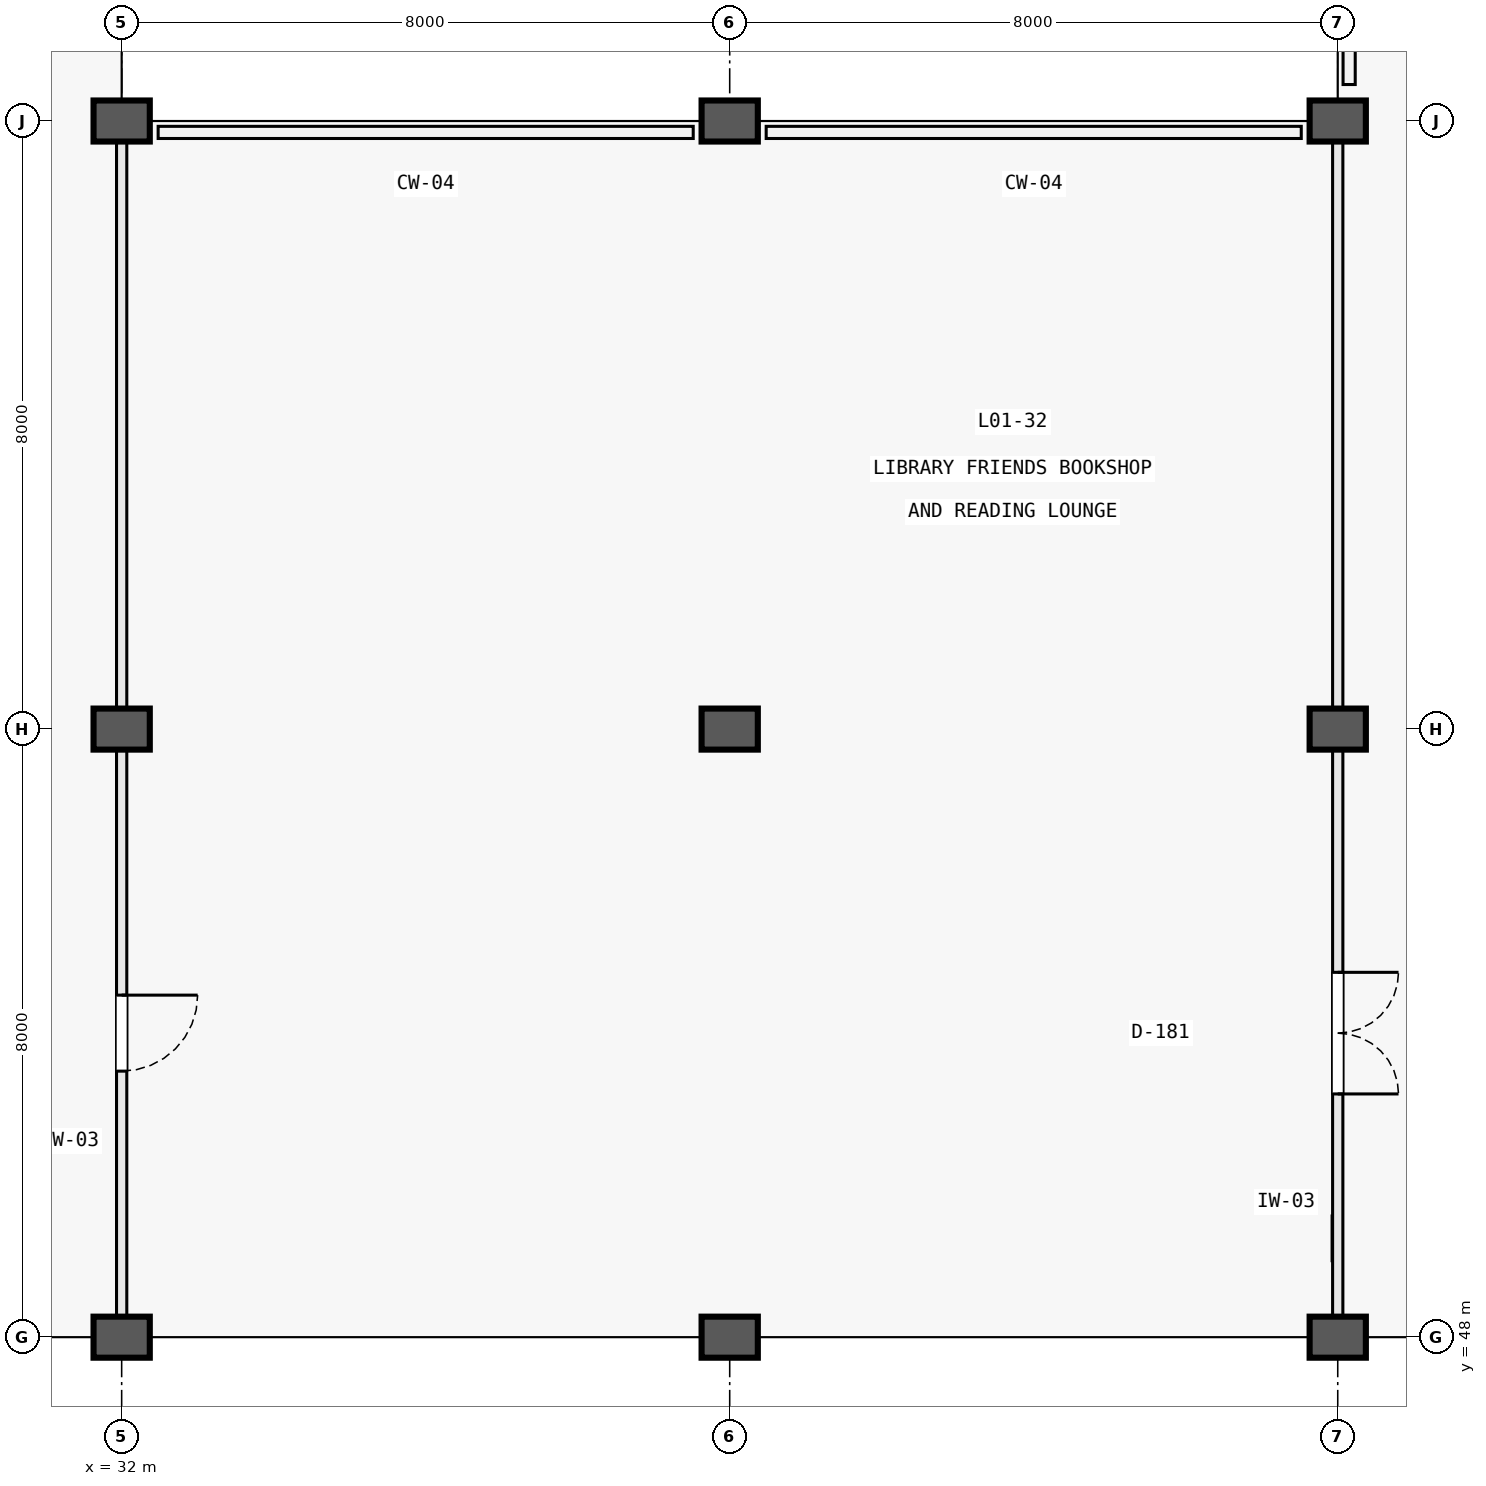
"""IFC4 building model, lengths in metres.
Left out: names, types, materials, properties, quantities, classifications, styles, units other than length and angle.
Written with IfcOpenShell. Run it as: python <this file> out.ifc"""

import sys

from ifc_helpers import new_model, si_unit, direction, frame, frame_2d, origin, origin_2d, place, context, subcontext, project, spatial, rectangle, extrude, element, fill, save


model = new_model("IFC4")
c1 = context("Model", 3, precision=1e-05, world=origin(), true_north=direction((0.0, 1.0)))
c2 = subcontext(c1, "Body", "Model", "MODEL_VIEW")
j1 = project(units=[si_unit("LENGTHUNIT", "METRE"), si_unit("PLANEANGLEUNIT", "RADIAN")], contexts=[c1])
p1 = place(None, origin())
s1 = spatial("IfcSite", under=j1, at=p1, CompositionType="ELEMENT")
p2 = place(p1, origin())
s2 = spatial("IfcBuilding", under=s1, at=p2, CompositionType="ELEMENT")
p3 = place(p2, origin())
s3 = spatial("IfcBuildingStorey", under=s2, at=p3, CompositionType="ELEMENT", Elevation=0.0)
for number, where, z_axis, x_axis in (
    (1, (32.0, 48.0, 0.0), (0.0, 0.0, 1.0), (1.0, 0.0, 0.0)),
    (2, (32.0, 56.0, 0.0), (0.0, 0.0, 1.0), (1.0, 0.0, 0.0)),
    (3, (32.0, 64.0, 0.0), (0.0, 0.0, 1.0), (1.0, 0.0, 0.0)),
    (4, (40.0, 48.0, 0.0), (0.0, 0.0, 1.0), (1.0, 0.0, 0.0)),
    (5, (40.0, 56.0, 0.0), (0.0, 0.0, 1.0), (1.0, 0.0, 0.0)),
    (6, (40.0, 64.0, 0.0), (0.0, 0.0, 1.0), (1.0, 0.0, 0.0)),
    (7, (48.0, 48.0, 0.0), (0.0, 0.0, 1.0), (1.0, 0.0, 0.0)),
    (8, (48.0, 56.0, 0.0), (0.0, 0.0, 1.0), (1.0, 0.0, 0.0)),
    (9, (48.0, 64.0, 0.0), (0.0, 0.0, 1.0), (1.0, 0.0, 0.0)),
):
    element("IfcColumn", number, at=place(p3, frame(where, z_axis=z_axis, x_axis=x_axis)), inside=s3, PredefinedType="COLUMN", context=c2, shape_type="SweptSolid", body=[
        extrude(rectangle(XDim=0.74, YDim=0.54, at=origin_2d()), origin(), (0.0, 0.0, 1.0), 5.4),
    ])
p4 = place(p3, frame((32.0, 48.28, 0.0), z_axis=(0.0, 0.0, 1.0), x_axis=(0.0, 1.0, 0.0)))
e10 = element("IfcWall", 10, at=p4, inside=s3, PredefinedType="PARTITIONING", context=c2, shape_type="SweptSolid", body=[
    extrude(rectangle(XDim=7.44, YDim=0.135, at=frame_2d((3.72, 0.0))), origin(), (0.0, 0.0, 1.0), 3.88),
])
p5 = place(p4, frame((3.22, 0.0, 0.0)))
e11 = element("IfcOpeningElement", 11, at=p5, cuts=e10, PredefinedType="OPENING", context=c2, shape_type="SweptSolid", body=[
    extrude(rectangle(XDim=1.0, YDim=2.15, at=frame_2d((0.5, 1.075))), frame((0.0, 0.08, 0.0), z_axis=(0.0, -1.0, 0.0), x_axis=(1.0, 0.0, 0.0)), (0.0, 0.0, 1.0), 0.159),
])
p6 = place(p3, frame((32.0, 56.28, 0.0), z_axis=(0.0, 0.0, 1.0), x_axis=(0.0, 1.0, 0.0)))
e12 = element("IfcWall", 12, at=p6, inside=s3, PredefinedType="PARTITIONING", context=c2, shape_type="SweptSolid", body=[
    extrude(rectangle(XDim=7.44, YDim=0.135, at=frame_2d((3.72, 0.0))), origin(), (0.0, 0.0, 1.0), 3.88),
])
p7 = place(p3, frame((48.0, 48.28, 0.0), z_axis=(0.0, 0.0, 1.0), x_axis=(0.0, 1.0, 0.0)))
e13 = element("IfcWall", 13, at=p7, inside=s3, PredefinedType="PARTITIONING", context=c2, shape_type="SweptSolid", body=[
    extrude(rectangle(XDim=7.44, YDim=0.135, at=frame_2d((3.72, 0.0))), origin(), (0.0, 0.0, 1.0), 3.88),
])
p8 = place(p7, frame((2.92, 0.0, 0.0)))
e14 = element("IfcOpeningElement", 14, at=p8, cuts=e13, PredefinedType="OPENING", context=c2, shape_type="SweptSolid", body=[
    extrude(rectangle(XDim=1.6, YDim=2.2, at=frame_2d((0.8, 1.1))), frame((0.0, 0.08, 0.0), z_axis=(0.0, -1.0, 0.0), x_axis=(1.0, 0.0, 0.0)), (0.0, 0.0, 1.0), 0.159),
])
p9 = place(p3, frame((48.0, 56.28, 0.0), z_axis=(0.0, 0.0, 1.0), x_axis=(0.0, 1.0, 0.0)))
e15 = element("IfcWall", 15, at=p9, inside=s3, PredefinedType="PARTITIONING", context=c2, shape_type="SweptSolid", body=[
    extrude(rectangle(XDim=7.44, YDim=0.135, at=frame_2d((3.72, 0.0))), origin(), (0.0, 0.0, 1.0), 3.88),
])
p10 = place(p5, frame((1.0, 0.0, 0.0), z_axis=(0.0, 0.0, 1.0), x_axis=(-1.0, 0.0, 0.0)))
e16 = element("IfcDoor", 16, at=p10, inside=s3, OperationType="SINGLE_SWING_RIGHT", PredefinedType="DOOR", context=c2, shape_type="SweptSolid", body=[
    extrude(rectangle(XDim=1.0, YDim=2.15, at=frame_2d((0.5, 1.075))), frame((0.0, 0.025, 0.0), z_axis=(0.0, -1.0, 0.0), x_axis=(1.0, 0.0, 0.0)), (0.0, 0.0, 1.0), 0.05),
])
fill(e11, e16)
p11 = place(p8, frame((1.6, 0.0, 0.0), z_axis=(0.0, 0.0, 1.0), x_axis=(-1.0, 0.0, 0.0)))
e17 = element("IfcDoor", 17, at=p11, inside=s3, OperationType="DOUBLE_DOOR_SINGLE_SWING", PredefinedType="DOOR", context=c2, shape_type="SweptSolid", body=[
    extrude(rectangle(XDim=1.6, YDim=2.2, at=frame_2d((0.8, 1.1))), frame((0.0, 0.025, 0.0), z_axis=(0.0, -1.0, 0.0), x_axis=(1.0, 0.0, 0.0)), (0.0, 0.0, 1.0), 0.05),
])
fill(e14, e17)
save(model, sys.argv[1])
